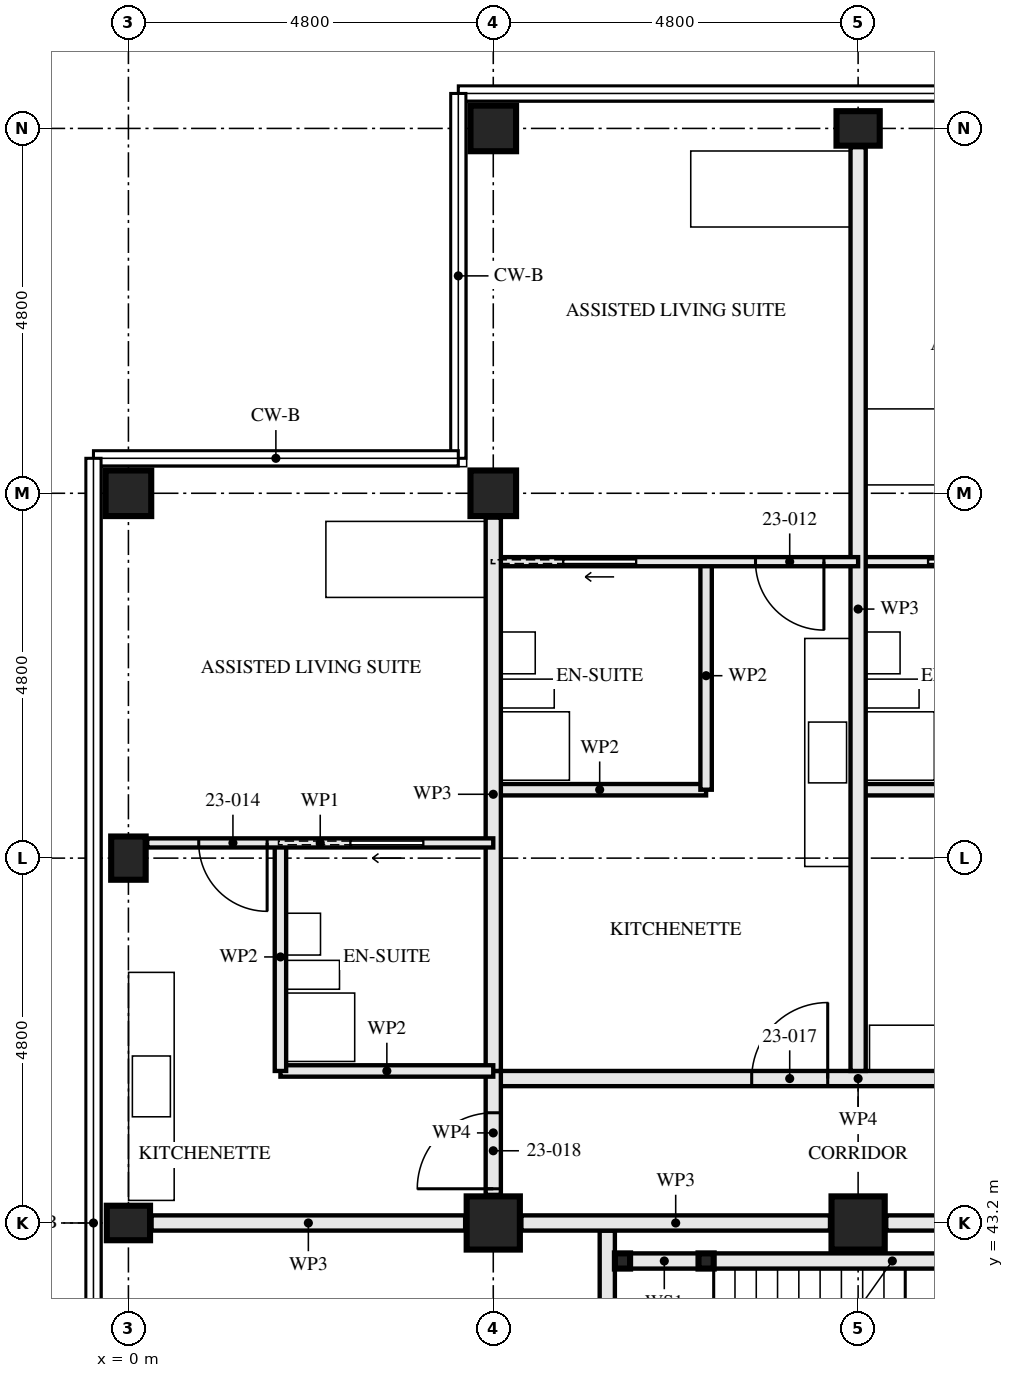
"""IFC4 building model, lengths in metres.
Left out: names, types, materials, properties, quantities, classifications, styles, units other than length and angle.
Written with IfcOpenShell. Run it as: python <this file> out.ifc"""

import sys

from ifc_helpers import new_model, si_unit, direction, frame, frame_2d, origin, origin_2d, place, context, subcontext, project, spatial, rectangle, hollow_rectangle, i_section, extrude, element, fill, save


model = new_model("IFC4")
c1 = context("Model", 3, precision=1e-05, world=origin(), true_north=direction((0.0, 1.0)))
c2 = subcontext(c1, "Body", "Model", "MODEL_VIEW")
j1 = project(units=[si_unit("LENGTHUNIT", "METRE"), si_unit("PLANEANGLEUNIT", "RADIAN")], contexts=[c1])
p1 = place(None, origin())
s1 = spatial("IfcSite", under=j1, at=p1, CompositionType="ELEMENT")
p2 = place(p1, origin())
s2 = spatial("IfcBuilding", under=s1, at=p2, CompositionType="ELEMENT")
p3 = place(p2, frame((0.0, 0.0, 87.5)))
s3 = spatial("IfcBuildingStorey", under=s2, at=p3, CompositionType="ELEMENT", Elevation=87.5)
for number, where, z_axis, x_axis in (
    (1, (0.0, 43.2, 0.0), (0.0, 0.0, 1.0), (0.0, 1.0, 0.0)),
    (2, (0.0, 48.0, 0.0), (0.0, 0.0, 1.0), (1.0, 0.0, 0.0)),
):
    element("IfcColumn", number, at=place(p3, frame(where, z_axis=z_axis, x_axis=x_axis)), inside=s3, PredefinedType="COLUMN", context=c2, shape_type="SweptSolid", body=[
        extrude(i_section(OverallWidth=0.454, OverallDepth=0.569, WebThickness=0.078, FlangeThickness=0.125, FilletRadius=0.015, at=origin_2d()), origin(), (0.0, 0.0, 1.0), 3.5),
    ])
p4 = place(p3, frame((0.0, 52.8, 0.0), z_axis=(0.0, 0.0, 1.0), x_axis=(0.0, 1.0, 0.0)))
e3 = element("IfcColumn", 3, at=p4, inside=s3, PredefinedType="COLUMN", context=c2, shape_type="SweptSolid", body=[
    extrude(hollow_rectangle(XDim=0.6, YDim=0.6, WallThickness=0.05, at=origin_2d()), origin(), (0.0, 0.0, 1.0), 3.5),
])
p5 = place(p3, frame((4.8, 43.2, 0.0), z_axis=(0.0, 0.0, 1.0), x_axis=(0.0, 1.0, 0.0)))
e4 = element("IfcColumn", 4, at=p5, inside=s3, PredefinedType="COLUMN", context=c2, shape_type="SweptSolid", body=[
    extrude(hollow_rectangle(XDim=0.7, YDim=0.7, WallThickness=0.06, at=origin_2d()), origin(), (0.0, 0.0, 1.0), 3.5),
])
for number, where, z_axis, x_axis in (
    (5, (4.8, 52.8, 0.0), (0.0, 0.0, 1.0), (0.0, 1.0, 0.0)),
    (6, (4.8, 57.6, 0.0), (0.0, 0.0, 1.0), (0.0, 1.0, 0.0)),
):
    element("IfcColumn", number, at=place(p3, frame(where, z_axis=z_axis, x_axis=x_axis)), inside=s3, PredefinedType="COLUMN", context=c2, shape_type="SweptSolid", body=[
        extrude(hollow_rectangle(XDim=0.6, YDim=0.6, WallThickness=0.05, at=origin_2d()), origin(), (0.0, 0.0, 1.0), 3.5),
    ])
p6 = place(p3, frame((9.6, 43.2, 0.0), z_axis=(0.0, 0.0, 1.0), x_axis=(0.0, 1.0, 0.0)))
e7 = element("IfcColumn", 7, at=p6, inside=s3, PredefinedType="COLUMN", context=c2, shape_type="SweptSolid", body=[
    extrude(hollow_rectangle(XDim=0.7, YDim=0.7, WallThickness=0.06, at=origin_2d()), origin(), (0.0, 0.0, 1.0), 3.5),
])
p7 = place(p3, frame((9.6, 57.6, 0.0), z_axis=(0.0, 0.0, 1.0), x_axis=(0.0, 1.0, 0.0)))
e8 = element("IfcColumn", 8, at=p7, inside=s3, PredefinedType="COLUMN", context=c2, shape_type="SweptSolid", body=[
    extrude(i_section(OverallWidth=0.454, OverallDepth=0.569, WebThickness=0.078, FlangeThickness=0.125, FilletRadius=0.015, at=origin_2d()), origin(), (0.0, 0.0, 1.0), 3.5),
])
for number, where, z_axis, x_axis in (
    (9, (6.5, 42.7, 0.0), (0.0, 0.0, 1.0), (1.0, 0.0, 0.0)),
    (10, (7.6, 42.7, 0.0), (0.0, 0.0, 1.0), (1.0, 0.0, 0.0)),
):
    element("IfcColumn", number, at=place(p3, frame(where, z_axis=z_axis, x_axis=x_axis)), inside=s3, PredefinedType="COLUMN", context=c2, shape_type="SweptSolid", body=[
        extrude(hollow_rectangle(XDim=0.2, YDim=0.2, WallThickness=0.008, at=origin_2d()), origin(), (0.0, 0.0, 1.0), 3.33),
    ])
p8 = place(p3, frame((6.6, 42.7, 0.0), z_axis=(0.0, 0.0, 1.0), x_axis=(1.0, 0.0, 0.0)))
e11 = element("IfcWall", 11, at=p8, inside=s3, PredefinedType="SOLIDWALL", context=c2, shape_type="SweptSolid", body=[
    extrude(rectangle(XDim=0.9, YDim=0.2, at=frame_2d((0.45, 0.0))), origin(), (0.0, 0.0, 1.0), 2.99),
])
p9 = place(p3, frame((7.7, 42.7, 0.0), z_axis=(0.0, 0.0, 1.0), x_axis=(1.0, 0.0, 0.0)))
e12 = element("IfcWall", 12, at=p9, inside=s3, PredefinedType="SOLIDWALL", context=c2, shape_type="SweptSolid", body=[
    extrude(rectangle(XDim=4.7, YDim=0.2, at=frame_2d((2.35, 0.0))), origin(), (0.0, 0.0, 1.0), 2.99),
])
p10 = place(p3, frame((6.3, 43.1, 0.0), z_axis=(0.0, 0.0, 1.0), x_axis=(0.0, -1.0, 0.0)))
e13 = element("IfcWall", 13, at=p10, inside=s3, PredefinedType="SOLIDWALL", context=c2, shape_type="SweptSolid", body=[
    extrude(rectangle(XDim=3.3, YDim=0.2, at=frame_2d((1.65, 0.0))), origin(), (0.0, 0.0, 1.0), 3.33),
])
p11 = place(p3, frame((12.4, 48.9, 0.0), z_axis=(0.0, 0.0, 1.0), x_axis=(-1.0, 0.0, 0.0)))
e14 = element("IfcWall", 14, at=p11, inside=s3, PredefinedType="PARTITIONING", context=c2, shape_type="SweptSolid", body=[
    extrude(rectangle(XDim=2.8, YDim=0.15, at=frame_2d((1.4, 0.0))), origin(), (0.0, 0.0, 1.0), 3.33),
])
p12 = place(p3, frame((14.4, 51.9, 0.0), z_axis=(0.0, 0.0, 1.0), x_axis=(-1.0, 0.0, 0.0)))
e15 = element("IfcWall", 15, at=p12, inside=s3, PredefinedType="PARTITIONING", context=c2, shape_type="SweptSolid", body=[
    extrude(rectangle(XDim=4.8, YDim=0.12, at=frame_2d((2.4, 0.0))), origin(), (0.0, 0.0, 1.0), 3.33),
])
p13 = place(p12, frame((0.45, 0.0, 0.0)))
e16 = element("IfcOpeningElement", 16, at=p13, cuts=e15, PredefinedType="OPENING", context=c2, shape_type="SweptSolid", body=[
    extrude(rectangle(XDim=0.9, YDim=2.1, at=frame_2d((0.45, 1.05))), frame((0.0, 0.071, 0.0), z_axis=(0.0, -1.0, 0.0), x_axis=(1.0, 0.0, 0.0)), (0.0, 0.0, 1.0), 0.141),
])
p14 = place(p12, frame((2.925, 0.0, 0.0)))
e17 = element("IfcOpeningElement", 17, at=p14, cuts=e15, PredefinedType="OPENING", context=c2, shape_type="SweptSolid", body=[
    extrude(rectangle(XDim=0.95, YDim=2.1, at=frame_2d((0.475, 1.05))), frame((0.0, 0.071, 0.0), z_axis=(0.0, -1.0, 0.0), x_axis=(1.0, 0.0, 0.0)), (0.0, 0.0, 1.0), 0.141),
])
p15 = place(p3, frame((9.6, 57.353, 0.0), z_axis=(0.0, 0.0, 1.0), x_axis=(0.0, -1.0, 0.0)))
e18 = element("IfcWall", 18, at=p15, inside=s3, PredefinedType="PARTITIONING", context=c2, shape_type="SweptSolid", body=[
    extrude(rectangle(XDim=12.153, YDim=0.2, at=frame_2d((6.077, 0.0))), origin(), (0.0, 0.0, 1.0), 2.55),
])
p16 = place(p3, frame((7.6, 51.9, 0.0), z_axis=(0.0, 0.0, 1.0), x_axis=(0.0, -1.0, 0.0)))
e19 = element("IfcWall", 19, at=p16, inside=s3, PredefinedType="PARTITIONING", context=c2, shape_type="SweptSolid", body=[
    extrude(rectangle(XDim=3.0, YDim=0.15, at=frame_2d((1.5, 0.0))), origin(), (0.0, 0.0, 1.0), 3.33),
])
p17 = place(p3, frame((7.6, 48.9, 0.0), z_axis=(0.0, 0.0, 1.0), x_axis=(-1.0, 0.0, 0.0)))
e20 = element("IfcWall", 20, at=p17, inside=s3, PredefinedType="PARTITIONING", context=c2, shape_type="SweptSolid", body=[
    extrude(rectangle(XDim=2.8, YDim=0.15, at=frame_2d((1.4, 0.0))), origin(), (0.0, 0.0, 1.0), 3.33),
])
p18 = place(p3, frame((9.6, 51.9, 0.0), z_axis=(0.0, 0.0, 1.0), x_axis=(-1.0, 0.0, 0.0)))
e21 = element("IfcWall", 21, at=p18, inside=s3, PredefinedType="PARTITIONING", context=c2, shape_type="SweptSolid", body=[
    extrude(rectangle(XDim=4.8, YDim=0.12, at=frame_2d((2.4, 0.0))), origin(), (0.0, 0.0, 1.0), 3.33),
])
p19 = place(p18, frame((0.45, 0.0, 0.0)))
e22 = element("IfcOpeningElement", 22, at=p19, cuts=e21, PredefinedType="OPENING", context=c2, shape_type="SweptSolid", body=[
    extrude(rectangle(XDim=0.9, YDim=2.1, at=frame_2d((0.45, 1.05))), frame((0.0, 0.071, 0.0), z_axis=(0.0, -1.0, 0.0), x_axis=(1.0, 0.0, 0.0)), (0.0, 0.0, 1.0), 0.141),
])
p20 = place(p18, frame((2.925, 0.0, 0.0)))
e23 = element("IfcOpeningElement", 23, at=p20, cuts=e21, PredefinedType="OPENING", context=c2, shape_type="SweptSolid", body=[
    extrude(rectangle(XDim=0.95, YDim=2.1, at=frame_2d((0.475, 1.05))), frame((0.0, 0.071, 0.0), z_axis=(0.0, -1.0, 0.0), x_axis=(1.0, 0.0, 0.0)), (0.0, 0.0, 1.0), 0.141),
])
p21 = place(p3, frame((4.8, 52.48, 0.0), z_axis=(0.0, 0.0, 1.0), x_axis=(0.0, -1.0, 0.0)))
e24 = element("IfcWall", 24, at=p21, inside=s3, PredefinedType="PARTITIONING", context=c2, shape_type="SweptSolid", body=[
    extrude(rectangle(XDim=7.28, YDim=0.2, at=frame_2d((3.64, 0.0))), origin(), (0.0, 0.0, 1.0), 2.55),
])
p22 = place(p3, frame((2.0, 48.2, 0.0), z_axis=(0.0, 0.0, 1.0), x_axis=(0.0, -1.0, 0.0)))
e25 = element("IfcWall", 25, at=p22, inside=s3, PredefinedType="PARTITIONING", context=c2, shape_type="SweptSolid", body=[
    extrude(rectangle(XDim=3.0, YDim=0.15, at=frame_2d((1.5, 0.0))), origin(), (0.0, 0.0, 1.0), 2.55),
])
p23 = place(p3, frame((4.8, 45.2, 0.0), z_axis=(0.0, 0.0, 1.0), x_axis=(-1.0, 0.0, 0.0)))
e26 = element("IfcWall", 26, at=p23, inside=s3, PredefinedType="PARTITIONING", context=c2, shape_type="SweptSolid", body=[
    extrude(rectangle(XDim=2.8, YDim=0.15, at=frame_2d((1.4, 0.0))), origin(), (0.0, 0.0, 1.0), 3.33),
])
p24 = place(p3, frame((4.8, 48.2, 0.0), z_axis=(0.0, 0.0, 1.0), x_axis=(-1.0, 0.0, 0.0)))
e27 = element("IfcWall", 27, at=p24, inside=s3, PredefinedType="PARTITIONING", context=c2, shape_type="SweptSolid", body=[
    extrude(rectangle(XDim=4.553, YDim=0.12, at=frame_2d((2.276, 0.0))), origin(), (0.0, 0.0, 1.0), 3.33),
])
p25 = place(p24, frame((2.975, 0.0, 0.0)))
e28 = element("IfcOpeningElement", 28, at=p25, cuts=e27, PredefinedType="OPENING", context=c2, shape_type="SweptSolid", body=[
    extrude(rectangle(XDim=0.9, YDim=2.1, at=frame_2d((0.45, 1.05))), frame((0.0, 0.071, 0.0), z_axis=(0.0, -1.0, 0.0), x_axis=(1.0, 0.0, 0.0)), (0.0, 0.0, 1.0), 0.141),
])
p26 = place(p24, frame((0.925, 0.0, 0.0)))
e29 = element("IfcOpeningElement", 29, at=p26, cuts=e27, PredefinedType="OPENING", context=c2, shape_type="SweptSolid", body=[
    extrude(rectangle(XDim=0.95, YDim=2.1, at=frame_2d((0.475, 1.05))), frame((0.0, 0.071, 0.0), z_axis=(0.0, -1.0, 0.0), x_axis=(1.0, 0.0, 0.0)), (0.0, 0.0, 1.0), 0.141),
])
p27 = place(p3, frame((14.4, 45.1, 0.0), z_axis=(0.0, 0.0, 1.0), x_axis=(-1.0, 0.0, 0.0)))
e30 = element("IfcWall", 30, at=p27, inside=s3, PredefinedType="PARTITIONING", context=c2, shape_type="SweptSolid", body=[
    extrude(rectangle(XDim=9.6, YDim=0.2, at=frame_2d((4.8, 0.0))), origin(), (0.0, 0.0, 1.0), 3.33),
])
p28 = place(p27, frame((0.4, 0.0, 0.0)))
e31 = element("IfcOpeningElement", 31, at=p28, cuts=e30, PredefinedType="OPENING", context=c2, shape_type="SweptSolid", body=[
    extrude(rectangle(XDim=1.0, YDim=2.1, at=frame_2d((0.5, 1.05))), frame((0.0, 0.111, 0.0), z_axis=(0.0, -1.0, 0.0), x_axis=(1.0, 0.0, 0.0)), (0.0, 0.0, 1.0), 0.221),
])
p29 = place(p27, frame((5.2, 0.0, 0.0)))
e32 = element("IfcOpeningElement", 32, at=p29, cuts=e30, PredefinedType="OPENING", context=c2, shape_type="SweptSolid", body=[
    extrude(rectangle(XDim=1.0, YDim=2.1, at=frame_2d((0.5, 1.05))), frame((0.0, 0.111, 0.0), z_axis=(0.0, -1.0, 0.0), x_axis=(1.0, 0.0, 0.0)), (0.0, 0.0, 1.0), 0.221),
])
p30 = place(p3, frame((4.8, 45.2, 0.0), z_axis=(0.0, 0.0, 1.0), x_axis=(0.0, -1.0, 0.0)))
e33 = element("IfcWall", 33, at=p30, inside=s3, PredefinedType="PARTITIONING", context=c2, shape_type="SweptSolid", body=[
    extrude(rectangle(XDim=1.63, YDim=0.2, at=frame_2d((0.815, 0.0))), origin(), (0.0, 0.0, 1.0), 3.33),
])
p31 = place(p30, frame((0.55, 0.0, 0.0)))
e34 = element("IfcOpeningElement", 34, at=p31, cuts=e33, PredefinedType="OPENING", context=c2, shape_type="SweptSolid", body=[
    extrude(rectangle(XDim=1.0, YDim=2.1, at=frame_2d((0.5, 1.05))), frame((0.0, 0.111, 0.0), z_axis=(0.0, -1.0, 0.0), x_axis=(1.0, 0.0, 0.0)), (0.0, 0.0, 1.0), 0.221),
])
p32 = place(p3, frame((12.5, 43.2, 0.0), z_axis=(0.0, 0.0, 1.0), x_axis=(-1.0, 0.0, 0.0)))
e35 = element("IfcWall", 35, at=p32, inside=s3, PredefinedType="PARTITIONING", context=c2, shape_type="SweptSolid", body=[
    extrude(rectangle(XDim=2.53, YDim=0.2, at=frame_2d((1.265, 0.0))), origin(), (0.0, 0.0, 1.0), 2.32),
])
p33 = place(p3, frame((9.23, 43.2, 0.0), z_axis=(0.0, 0.0, 1.0), x_axis=(-1.0, 0.0, 0.0)))
e36 = element("IfcWall", 36, at=p33, inside=s3, PredefinedType="PARTITIONING", context=c2, shape_type="SweptSolid", body=[
    extrude(rectangle(XDim=4.06, YDim=0.2, at=frame_2d((2.03, 0.0))), origin(), (0.0, 0.0, 1.0), 2.32),
])
p34 = place(p3, frame((4.43, 43.2, 0.0), z_axis=(0.0, 0.0, 1.0), x_axis=(-1.0, 0.0, 0.0)))
e37 = element("IfcWall", 37, at=p34, inside=s3, PredefinedType="PARTITIONING", context=c2, shape_type="SweptSolid", body=[
    extrude(rectangle(XDim=4.125, YDim=0.2, at=frame_2d((2.063, 0.0))), origin(), (0.0, 0.0, 1.0), 2.32),
])
p35 = place(p14, origin())
e38 = element("IfcDoor", 38, at=p35, inside=s3, OperationType="SLIDING_TO_RIGHT", PredefinedType="DOOR", context=c2, shape_type="SweptSolid", body=[
    extrude(rectangle(XDim=0.95, YDim=2.1, at=frame_2d((0.475, 1.05))), frame((0.0, 0.022, 0.0), z_axis=(0.0, -1.0, 0.0), x_axis=(1.0, 0.0, 0.0)), (0.0, 0.0, 1.0), 0.044),
])
fill(e17, e38)
p36 = place(p19, origin())
e39 = element("IfcDoor", 39, at=p36, inside=s3, OperationType="SINGLE_SWING_RIGHT", PredefinedType="DOOR", context=c2, shape_type="SweptSolid", body=[
    extrude(rectangle(XDim=0.9, YDim=2.1, at=frame_2d((0.45, 1.05))), frame((0.0, 0.022, 0.0), z_axis=(0.0, -1.0, 0.0), x_axis=(1.0, 0.0, 0.0)), (0.0, 0.0, 1.0), 0.044),
])
fill(e22, e39)
p37 = place(p20, origin())
e40 = element("IfcDoor", 40, at=p37, inside=s3, OperationType="SLIDING_TO_LEFT", PredefinedType="DOOR", context=c2, shape_type="SweptSolid", body=[
    extrude(rectangle(XDim=0.95, YDim=2.1, at=frame_2d((0.475, 1.05))), frame((0.0, 0.022, 0.0), z_axis=(0.0, -1.0, 0.0), x_axis=(1.0, 0.0, 0.0)), (0.0, 0.0, 1.0), 0.044),
])
fill(e23, e40)
p38 = place(p25, origin())
e41 = element("IfcDoor", 41, at=p38, inside=s3, OperationType="SINGLE_SWING_RIGHT", PredefinedType="DOOR", context=c2, shape_type="SweptSolid", body=[
    extrude(rectangle(XDim=0.9, YDim=2.1, at=frame_2d((0.45, 1.05))), frame((0.0, 0.022, 0.0), z_axis=(0.0, -1.0, 0.0), x_axis=(1.0, 0.0, 0.0)), (0.0, 0.0, 1.0), 0.044),
])
fill(e28, e41)
p39 = place(p26, origin())
e42 = element("IfcDoor", 42, at=p39, inside=s3, OperationType="SLIDING_TO_LEFT", PredefinedType="DOOR", context=c2, shape_type="SweptSolid", body=[
    extrude(rectangle(XDim=0.95, YDim=2.1, at=frame_2d((0.475, 1.05))), frame((0.0, 0.022, 0.0), z_axis=(0.0, -1.0, 0.0), x_axis=(1.0, 0.0, 0.0)), (0.0, 0.0, 1.0), 0.044),
])
fill(e29, e42)
p40 = place(p29, frame((1.0, 0.0, 0.0), z_axis=(0.0, 0.0, 1.0), x_axis=(-1.0, 0.0, 0.0)))
e43 = element("IfcDoor", 43, at=p40, inside=s3, OperationType="SINGLE_SWING_LEFT", PredefinedType="DOOR", context=c2, shape_type="SweptSolid", body=[
    extrude(rectangle(XDim=1.0, YDim=2.1, at=frame_2d((0.5, 1.05))), frame((0.0, 0.027, 0.0), z_axis=(0.0, -1.0, 0.0), x_axis=(1.0, 0.0, 0.0)), (0.0, 0.0, 1.0), 0.054),
])
fill(e32, e43)
p41 = place(p31, frame((1.0, 0.0, 0.0), z_axis=(0.0, 0.0, 1.0), x_axis=(-1.0, 0.0, 0.0)))
e44 = element("IfcDoor", 44, at=p41, inside=s3, OperationType="SINGLE_SWING_RIGHT", PredefinedType="DOOR", context=c2, shape_type="SweptSolid", body=[
    extrude(rectangle(XDim=1.0, YDim=2.1, at=frame_2d((0.5, 1.05))), frame((0.0, 0.027, 0.0), z_axis=(0.0, -1.0, 0.0), x_axis=(1.0, 0.0, 0.0)), (0.0, 0.0, 1.0), 0.054),
])
fill(e34, e44)
save(model, sys.argv[1])
